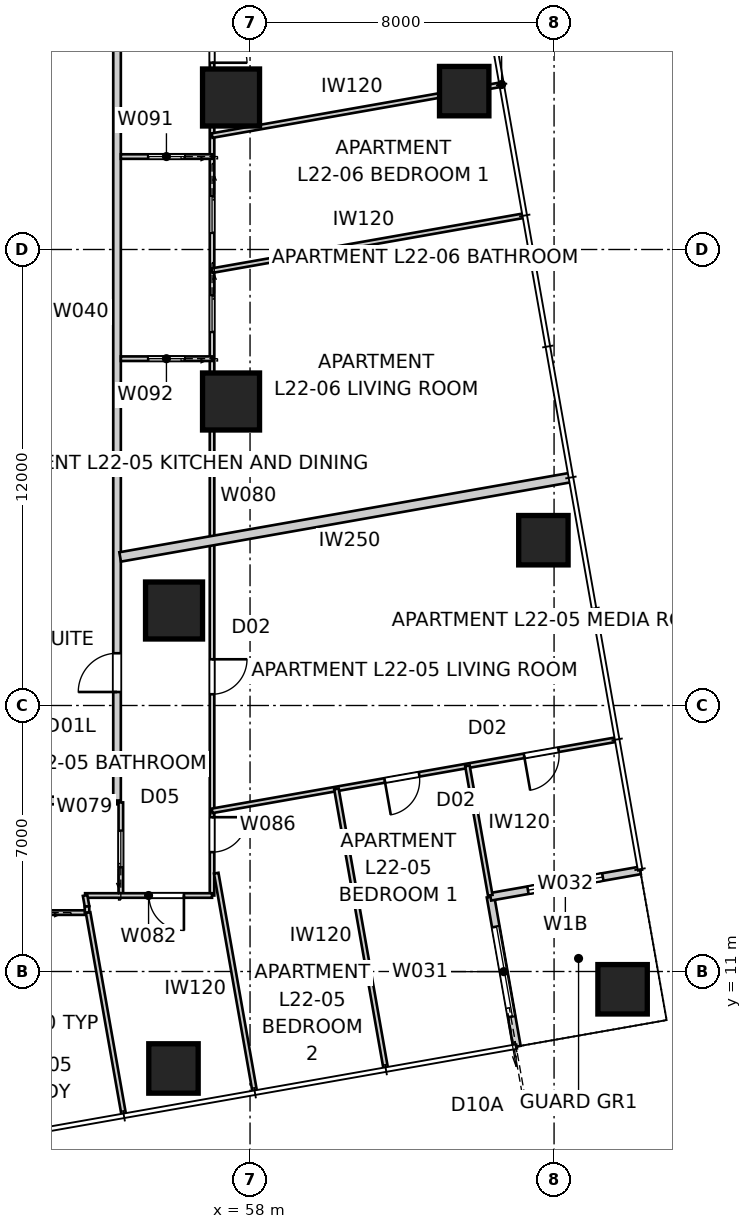
"""IFC4 building model, lengths in metres.
Left out: names, types, materials, properties, quantities, classifications, styles, units other than length and angle.
Written with IfcOpenShell. Run it as: python <this file> out.ifc"""

import sys

from ifc_helpers import new_model, si_unit, direction, frame, frame_2d, origin, origin_2d, place, context, subcontext, project, spatial, rectangle, extrude, element, fill, save


model = new_model("IFC4")
c1 = context("Model", 3, precision=1e-05, world=origin(), true_north=direction((0.0, 1.0)))
c2 = subcontext(c1, "Body", "Model", "MODEL_VIEW")
j1 = project(units=[si_unit("LENGTHUNIT", "METRE"), si_unit("PLANEANGLEUNIT", "RADIAN")], contexts=[c1])
p1 = place(None, origin())
s1 = spatial("IfcSite", under=j1, at=p1, CompositionType="ELEMENT")
p2 = place(p1, origin())
s2 = spatial("IfcBuilding", under=s1, at=p2, CompositionType="ELEMENT")
p3 = place(p2, frame((0.0, 0.0, 82.8)))
s3 = spatial("IfcBuildingStorey", under=s2, at=p3, CompositionType="ELEMENT", Elevation=82.8)
for number, where, z_axis, x_axis in (
    (1, (55.985, 8.448, 0.0), (0.0, 0.0, 1.0), (1.0, 0.0, 0.0)),
    (2, (67.803, 10.532, 0.0), (0.0, 0.0, 1.0), (1.0, 0.0, 0.0)),
    (3, (65.719, 22.35, 0.0), (0.0, 0.0, 1.0), (1.0, 0.0, 0.0)),
    (4, (63.635, 34.167, 0.0), (0.0, 0.0, 1.0), (1.0, 0.0, 0.0)),
):
    element("IfcColumn", number, at=place(p3, frame(where, z_axis=z_axis, x_axis=x_axis)), inside=s3, PredefinedType="COLUMN", context=c2, shape_type="SweptSolid", body=[
        extrude(rectangle(XDim=1.3, YDim=1.3, at=origin_2d()), origin(), (0.0, 0.0, 1.0), 3.4),
    ])
for number, where, z_axis, x_axis in (
    (5, (57.5, 26.0, 0.0), (0.0, 0.0, 1.0), (1.0, 0.0, 0.0)),
    (6, (57.5, 34.0, 0.0), (0.0, 0.0, 1.0), (1.0, 0.0, 0.0)),
    (7, (56.0, 20.5, 0.0), (0.0, 0.0, 1.0), (1.0, 0.0, 0.0)),
):
    element("IfcColumn", number, at=place(p3, frame(where, z_axis=z_axis, x_axis=x_axis)), inside=s3, PredefinedType="COLUMN", context=c2, shape_type="SweptSolid", body=[
        extrude(rectangle(XDim=1.5, YDim=1.5, at=origin_2d()), origin(), (0.0, 0.0, 1.0), 3.4),
    ])
p4 = place(p3, frame((65.022, 9.026, 0.0), z_axis=(0.0, 0.0, 1.0), x_axis=(-0.173646056486, 0.984808127031, 0.0)))
e8 = element("IfcWall", 8, at=p4, inside=s3, PredefinedType="SOLIDWALL", context=c2, shape_type="SweptSolid", body=[
    extrude(rectangle(XDim=4.0, YDim=0.2, at=frame_2d((2.0, 0.0))), origin(), (0.0, 0.0, 1.0), 3.25),
])
p5 = place(p4, frame((0.8, 0.0, 0.0)))
e9 = element("IfcOpeningElement", 9, at=p5, cuts=e8, PredefinedType="OPENING", context=c2, shape_type="SweptSolid", body=[
    extrude(rectangle(XDim=2.4, YDim=2.1, at=frame_2d((1.2, 1.05))), frame((0.0, 0.11, 0.0), z_axis=(0.0, -1.0, 0.0), x_axis=(1.0, 0.0, 0.0)), (0.0, 0.0, 1.0), 0.22),
])
p6 = place(p3, frame((64.328, 12.966, 0.0), z_axis=(0.0, 0.0, 1.0), x_axis=(0.984808127031, 0.173646056486, 0.0)))
e10 = element("IfcWall", 10, at=p6, inside=s3, PredefinedType="SOLIDWALL", context=c2, shape_type="SweptSolid", body=[
    extrude(rectangle(XDim=4.0, YDim=0.2, at=frame_2d((2.0, 0.0))), origin(), (0.0, 0.0, 1.0), 3.25),
])
p7 = place(p6, frame((1.0, 0.0, 0.45)))
e11 = element("IfcOpeningElement", 11, at=p7, cuts=e10, PredefinedType="OPENING", context=c2, shape_type="SweptSolid", body=[
    extrude(rectangle(XDim=2.0, YDim=1.8, at=frame_2d((1.0, 0.9))), frame((0.0, 0.11, 0.0), z_axis=(0.0, -1.0, 0.0), x_axis=(1.0, 0.0, 0.0)), (0.0, 0.0, 1.0), 0.22),
])
p8 = place(p3, frame((25.5, 15.5, 0.0), z_axis=(0.0, 0.0, 1.0), x_axis=(1.0, 0.0, 0.0)))
e12 = element("IfcWall", 12, at=p8, inside=s3, PredefinedType="PARTITIONING", context=c2, shape_type="SweptSolid", body=[
    extrude(rectangle(XDim=29.0, YDim=0.2, at=frame_2d((14.5, 0.0))), origin(), (0.0, 0.0, 1.0), 3.25),
])
p9 = place(p8, frame((15.794, 0.0, 0.0)))
e13 = element("IfcOpeningElement", 13, at=p9, cuts=e12, PredefinedType="OPENING", context=c2, shape_type="SweptSolid", body=[
    extrude(rectangle(XDim=1.02, YDim=2.34, at=frame_2d((0.51, 1.17))), frame((0.0, 0.11, 0.0), z_axis=(0.0, -1.0, 0.0), x_axis=(1.0, 0.0, 0.0)), (0.0, 0.0, 1.0), 0.22),
])
p10 = place(p8, frame((6.067, 0.0, 0.0)))
e14 = element("IfcOpeningElement", 14, at=p10, cuts=e12, PredefinedType="OPENING", context=c2, shape_type="SweptSolid", body=[
    extrude(rectangle(XDim=1.02, YDim=2.34, at=frame_2d((0.51, 1.17))), frame((0.0, 0.11, 0.0), z_axis=(0.0, -1.0, 0.0), x_axis=(1.0, 0.0, 0.0)), (0.0, 0.0, 1.0), 0.22),
])
p11 = place(p8, frame((1.079, 0.0, 0.0)))
e15 = element("IfcOpeningElement", 15, at=p11, cuts=e12, PredefinedType="OPENING", context=c2, shape_type="SweptSolid", body=[
    extrude(rectangle(XDim=1.02, YDim=2.34, at=frame_2d((0.51, 1.17))), frame((0.0, 0.11, 0.0), z_axis=(0.0, -1.0, 0.0), x_axis=(1.0, 0.0, 0.0)), (0.0, 0.0, 1.0), 0.22),
])
p12 = place(p3, frame((54.5, 15.5, 0.0), z_axis=(0.0, 0.0, 1.0), x_axis=(0.0, 1.0, 0.0)))
e16 = element("IfcWall", 16, at=p12, inside=s3, PredefinedType="PARTITIONING", context=c2, shape_type="SweptSolid", body=[
    extrude(rectangle(XDim=29.0, YDim=0.2, at=frame_2d((14.5, 0.0))), origin(), (0.0, 0.0, 1.0), 3.25),
])
p13 = place(p12, frame((21.815, 0.0, 0.0)))
e17 = element("IfcOpeningElement", 17, at=p13, cuts=e16, PredefinedType="OPENING", context=c2, shape_type="SweptSolid", body=[
    extrude(rectangle(XDim=1.02, YDim=2.34, at=frame_2d((0.51, 1.17))), frame((0.0, 0.11, 0.0), z_axis=(0.0, -1.0, 0.0), x_axis=(1.0, 0.0, 0.0)), (0.0, 0.0, 1.0), 0.22),
])
p14 = place(p12, frame((2.855, 0.0, 0.0)))
e18 = element("IfcOpeningElement", 18, at=p14, cuts=e16, PredefinedType="OPENING", context=c2, shape_type="SweptSolid", body=[
    extrude(rectangle(XDim=1.02, YDim=2.1, at=frame_2d((0.51, 1.05))), frame((0.0, 0.11, 0.0), z_axis=(0.0, -1.0, 0.0), x_axis=(1.0, 0.0, 0.0)), (0.0, 0.0, 1.0), 0.22),
])
p15 = place(p3, frame((66.444, 24.001, 0.0), z_axis=(0.0, 0.0, 1.0), x_axis=(-0.984806609184, -0.173654664517, 0.0)))
e19 = element("IfcWall", 19, at=p15, inside=s3, PredefinedType="PARTITIONING", context=c2, shape_type="SweptSolid", body=[
    extrude(rectangle(XDim=12.044, YDim=0.25, at=frame_2d((6.022, 0.0))), origin(), (0.0, 0.0, 1.0), 3.25),
])
p16 = place(p3, frame((54.6, 13.0, 0.0), z_axis=(0.0, 0.0, 1.0), x_axis=(0.0, 1.0, 0.0)))
e20 = element("IfcWall", 20, at=p16, inside=s3, PredefinedType="PARTITIONING", context=c2, shape_type="SweptSolid", body=[
    extrude(rectangle(XDim=2.45, YDim=0.12, at=frame_2d((1.225, 0.0))), origin(), (0.0, 0.0, 1.0), 3.25),
])
p17 = place(p16, frame((0.745, 0.0, 0.0)))
e21 = element("IfcOpeningElement", 21, at=p17, cuts=e20, PredefinedType="OPENING", context=c2, shape_type="SweptSolid", body=[
    extrude(rectangle(XDim=0.96, YDim=2.1, at=frame_2d((0.48, 1.05))), frame((0.0, 0.07, 0.0), z_axis=(0.0, -1.0, 0.0), x_axis=(1.0, 0.0, 0.0)), (0.0, 0.0, 1.0), 0.14),
])
p18 = place(p3, frame((57.0, 47.0, 0.0), z_axis=(0.0, 0.0, 1.0), x_axis=(0.0, -1.0, 0.0)))
e22 = element("IfcWall", 22, at=p18, inside=s3, PredefinedType="PARTITIONING", context=c2, shape_type="SweptSolid", body=[
    extrude(rectangle(XDim=34.0, YDim=0.12, at=frame_2d((17.0, 0.0))), origin(), (0.0, 0.0, 1.0), 2.55),
])
p19 = place(p18, frame((8.361, 0.0, 0.0)))
e23 = element("IfcOpeningElement", 23, at=p19, cuts=e22, PredefinedType="OPENING", context=c2, shape_type="SweptSolid", body=[
    extrude(rectangle(XDim=0.92, YDim=2.34, at=frame_2d((0.46, 1.17))), frame((0.0, 0.07, 0.0), z_axis=(0.0, -1.0, 0.0), x_axis=(1.0, 0.0, 0.0)), (0.0, 0.0, 1.0), 0.14),
])
p20 = place(p18, frame((11.166, 0.0, 0.0)))
e24 = element("IfcOpeningElement", 24, at=p20, cuts=e22, PredefinedType="OPENING", context=c2, shape_type="SweptSolid", body=[
    extrude(rectangle(XDim=0.92, YDim=2.34, at=frame_2d((0.46, 1.17))), frame((0.0, 0.07, 0.0), z_axis=(0.0, -1.0, 0.0), x_axis=(1.0, 0.0, 0.0)), (0.0, 0.0, 1.0), 0.14),
])
p21 = place(p18, frame((4.683, 0.0, 0.0)))
e25 = element("IfcOpeningElement", 25, at=p21, cuts=e22, PredefinedType="OPENING", context=c2, shape_type="SweptSolid", body=[
    extrude(rectangle(XDim=0.92, YDim=2.34, at=frame_2d((0.46, 1.17))), frame((0.0, 0.07, 0.0), z_axis=(0.0, -1.0, 0.0), x_axis=(1.0, 0.0, 0.0)), (0.0, 0.0, 1.0), 0.14),
])
p22 = place(p18, frame((27.784, 0.0, 0.0)))
e26 = element("IfcOpeningElement", 26, at=p22, cuts=e22, PredefinedType="OPENING", context=c2, shape_type="SweptSolid", body=[
    extrude(rectangle(XDim=0.92, YDim=2.34, at=frame_2d((0.46, 1.17))), frame((0.0, 0.07, 0.0), z_axis=(0.0, -1.0, 0.0), x_axis=(1.0, 0.0, 0.0)), (0.0, 0.0, 1.0), 0.14),
])
p23 = place(p18, frame((31.939, 0.0, 0.0)))
e27 = element("IfcOpeningElement", 27, at=p23, cuts=e22, PredefinedType="OPENING", context=c2, shape_type="SweptSolid", body=[
    extrude(rectangle(XDim=0.92, YDim=2.34, at=frame_2d((0.46, 1.17))), frame((0.0, 0.07, 0.0), z_axis=(0.0, -1.0, 0.0), x_axis=(1.0, 0.0, 0.0)), (0.0, 0.0, 1.0), 0.14),
])
p24 = place(p18, frame((15.601, 0.0, 0.0)))
e28 = element("IfcOpeningElement", 28, at=p24, cuts=e22, PredefinedType="OPENING", context=c2, shape_type="SweptSolid", body=[
    extrude(rectangle(XDim=0.96, YDim=2.1, at=frame_2d((0.48, 1.05))), frame((0.0, 0.07, 0.0), z_axis=(0.0, -1.0, 0.0), x_axis=(1.0, 0.0, 0.0)), (0.0, 0.0, 1.0), 0.14),
])
p25 = place(p18, frame((18.21, 0.0, 0.0)))
e29 = element("IfcOpeningElement", 29, at=p25, cuts=e22, PredefinedType="OPENING", context=c2, shape_type="SweptSolid", body=[
    extrude(rectangle(XDim=0.96, YDim=2.1, at=frame_2d((0.48, 1.05))), frame((0.0, 0.07, 0.0), z_axis=(0.0, -1.0, 0.0), x_axis=(1.0, 0.0, 0.0)), (0.0, 0.0, 1.0), 0.14),
])
p26 = place(p18, frame((1.19, 0.0, 0.0)))
e30 = element("IfcOpeningElement", 30, at=p26, cuts=e22, PredefinedType="OPENING", context=c2, shape_type="SweptSolid", body=[
    extrude(rectangle(XDim=0.96, YDim=2.1, at=frame_2d((0.48, 1.05))), frame((0.0, 0.07, 0.0), z_axis=(0.0, -1.0, 0.0), x_axis=(1.0, 0.0, 0.0)), (0.0, 0.0, 1.0), 0.14),
])
p27 = place(p3, frame((57.0, 13.0, 0.0), z_axis=(0.0, 0.0, 1.0), x_axis=(-1.0, 0.0, 0.0)))
e31 = element("IfcWall", 31, at=p27, inside=s3, PredefinedType="PARTITIONING", context=c2, shape_type="SweptSolid", body=[
    extrude(rectangle(XDim=3.34, YDim=0.12, at=frame_2d((1.67, 0.0))), origin(), (0.0, 0.0, 1.0), 3.25),
])
p28 = place(p27, frame((0.74, 0.0, 0.0)))
e32 = element("IfcOpeningElement", 32, at=p28, cuts=e31, PredefinedType="OPENING", context=c2, shape_type="SweptSolid", body=[
    extrude(rectangle(XDim=0.92, YDim=2.34, at=frame_2d((0.46, 1.17))), frame((0.0, 0.07, 0.0), z_axis=(0.0, -1.0, 0.0), x_axis=(1.0, 0.0, 0.0)), (0.0, 0.0, 1.0), 0.14),
])
p29 = place(p3, frame((53.71, 12.55, 0.0), z_axis=(0.0, 0.0, 1.0), x_axis=(-1.0, 0.0, 0.0)))
e33 = element("IfcWall", 33, at=p29, inside=s3, PredefinedType="PARTITIONING", context=c2, shape_type="SweptSolid", body=[
    extrude(rectangle(XDim=3.525, YDim=0.12, at=frame_2d((1.763, 0.0))), origin(), (0.0, 0.0, 1.0), 3.25),
])
p30 = place(p29, frame((1.283, 0.0, 0.0)))
e34 = element("IfcOpeningElement", 34, at=p30, cuts=e33, PredefinedType="OPENING", context=c2, shape_type="SweptSolid", body=[
    extrude(rectangle(XDim=0.96, YDim=2.1, at=frame_2d((0.48, 1.05))), frame((0.0, 0.07, 0.0), z_axis=(0.0, -1.0, 0.0), x_axis=(1.0, 0.0, 0.0)), (0.0, 0.0, 1.0), 0.14),
])
p31 = place(p3, frame((53.66, 13.0, 0.0), z_axis=(0.0, 0.0, 1.0), x_axis=(0.172927442902, -0.984934566096, 0.0)))
e35 = element("IfcWall", 35, at=p31, inside=s3, PredefinedType="PARTITIONING", context=c2, shape_type="SweptSolid", body=[
    extrude(rectangle(XDim=0.292, YDim=0.12, at=frame_2d((0.146, 0.0))), origin(), (0.0, 0.0, 1.0), 3.25),
])
p32 = place(p3, frame((67.62, 17.1, 0.0), z_axis=(0.0, 0.0, 1.0), x_axis=(-0.984807253583, -0.173651010046, 0.0)))
e36 = element("IfcWall", 36, at=p32, inside=s3, PredefinedType="PARTITIONING", context=c2, shape_type="SweptSolid", body=[
    extrude(rectangle(XDim=10.783, YDim=0.12, at=frame_2d((5.392, 0.0))), origin(), (0.0, 0.0, 1.0), 3.25),
])
p33 = place(p32, frame((1.525, 0.0, 0.0)))
e37 = element("IfcOpeningElement", 37, at=p33, cuts=e36, PredefinedType="OPENING", context=c2, shape_type="SweptSolid", body=[
    extrude(rectangle(XDim=0.92, YDim=2.34, at=frame_2d((0.46, 1.17))), frame((0.0, 0.07, 0.0), z_axis=(0.0, -1.0, 0.0), x_axis=(1.0, 0.0, 0.0)), (0.0, 0.0, 1.0), 0.14),
])
p34 = place(p32, frame((5.25, 0.0, 0.0)))
e38 = element("IfcOpeningElement", 38, at=p34, cuts=e36, PredefinedType="OPENING", context=c2, shape_type="SweptSolid", body=[
    extrude(rectangle(XDim=0.92, YDim=2.34, at=frame_2d((0.46, 1.17))), frame((0.0, 0.07, 0.0), z_axis=(0.0, -1.0, 0.0), x_axis=(1.0, 0.0, 0.0)), (0.0, 0.0, 1.0), 0.14),
])
p35 = place(p3, frame((61.568, 8.458, 0.0), z_axis=(0.0, 0.0, 1.0), x_axis=(-0.173647177755, 0.984807929323, 0.0)))
e39 = element("IfcWall", 39, at=p35, inside=s3, PredefinedType="PARTITIONING", context=c2, shape_type="SweptSolid", body=[
    extrude(rectangle(XDim=7.46, YDim=0.12, at=frame_2d((3.73, 0.0))), origin(), (0.0, 0.0, 1.0), 3.25),
])
p36 = place(p3, frame((63.72, 16.412, 0.0), z_axis=(0.0, 0.0, 1.0), x_axis=(0.173660541335, -0.984805572884, 0.0)))
e40 = element("IfcWall", 40, at=p36, inside=s3, PredefinedType="PARTITIONING", context=c2, shape_type="SweptSolid", body=[
    extrude(rectangle(XDim=3.46, YDim=0.12, at=frame_2d((1.73, 0.0))), origin(), (0.0, 0.0, 1.0), 3.25),
])
p37 = place(p3, frame((58.122, 7.85, 0.0), z_axis=(0.0, 0.0, 1.0), x_axis=(-0.173634707655, 0.984810128044, 0.0)))
e41 = element("IfcWall", 41, at=p37, inside=s3, PredefinedType="PARTITIONING", context=c2, shape_type="SweptSolid", body=[
    extrude(rectangle(XDim=5.825, YDim=0.12, at=frame_2d((2.913, 0.0))), origin(), (0.0, 0.0, 1.0), 2.638),
])
p38 = place(p3, frame((53.739, 12.55, 0.0), z_axis=(0.0, 0.0, 1.0), x_axis=(0.173632864151, -0.984810453076, 0.0)))
e42 = element("IfcWall", 42, at=p38, inside=s3, PredefinedType="PARTITIONING", context=c2, shape_type="SweptSolid", body=[
    extrude(rectangle(XDim=5.389, YDim=0.12, at=frame_2d((2.695, 0.0))), origin(), (0.0, 0.0, 1.0), 3.25),
])
p39 = place(p3, frame((57.0, 32.446, 0.0), z_axis=(0.0, 0.0, 1.0), x_axis=(-1.0, 0.0, 0.0)))
e43 = element("IfcWall", 43, at=p39, inside=s3, PredefinedType="PARTITIONING", context=c2, shape_type="SweptSolid", body=[
    extrude(rectangle(XDim=2.4, YDim=0.12, at=frame_2d((1.2, 0.0))), origin(), (0.0, 0.0, 1.0), 3.25),
])
p40 = place(p39, frame((0.72, 0.0, 0.0)))
e44 = element("IfcOpeningElement", 44, at=p40, cuts=e43, PredefinedType="OPENING", context=c2, shape_type="SweptSolid", body=[
    extrude(rectangle(XDim=0.96, YDim=2.1, at=frame_2d((0.48, 1.05))), frame((0.0, 0.07, 0.0), z_axis=(0.0, -1.0, 0.0), x_axis=(1.0, 0.0, 0.0)), (0.0, 0.0, 1.0), 0.14),
])
p41 = place(p3, frame((57.0, 27.126, 0.0), z_axis=(0.0, 0.0, 1.0), x_axis=(-1.0, 0.0, 0.0)))
e45 = element("IfcWall", 45, at=p41, inside=s3, PredefinedType="PARTITIONING", context=c2, shape_type="SweptSolid", body=[
    extrude(rectangle(XDim=2.4, YDim=0.12, at=frame_2d((1.2, 0.0))), origin(), (0.0, 0.0, 1.0), 2.795),
])
p42 = place(p41, frame((0.72, 0.0, 0.0)))
e46 = element("IfcOpeningElement", 46, at=p42, cuts=e45, PredefinedType="OPENING", context=c2, shape_type="SweptSolid", body=[
    extrude(rectangle(XDim=0.96, YDim=2.1, at=frame_2d((0.48, 1.05))), frame((0.0, 0.07, 0.0), z_axis=(0.0, -1.0, 0.0), x_axis=(1.0, 0.0, 0.0)), (0.0, 0.0, 1.0), 0.14),
])
p43 = place(p3, frame((57.0, 29.444, 0.0), z_axis=(0.0, 0.0, 1.0), x_axis=(0.984807787824, 0.173647980238, 0.0)))
e47 = element("IfcWall", 47, at=p43, inside=s3, PredefinedType="PARTITIONING", context=c2, shape_type="SweptSolid", body=[
    extrude(rectangle(XDim=8.315, YDim=0.12, at=frame_2d((4.157, 0.0))), origin(), (0.0, 0.0, 1.0), 3.25),
])
p44 = place(p3, frame((57.0, 32.998, 0.0), z_axis=(0.0, 0.0, 1.0), x_axis=(0.984808453088, 0.173644207293, 0.0)))
e48 = element("IfcWall", 48, at=p44, inside=s3, PredefinedType="PARTITIONING", context=c2, shape_type="SweptSolid", body=[
    extrude(rectangle(XDim=7.698, YDim=0.12, at=frame_2d((3.849, 0.0))), origin(), (0.0, 0.0, 1.0), 3.25),
])
p45 = place(p3, frame((53.71, 12.712, 0.0), z_axis=(0.0, 0.0, 1.0), x_axis=(0.0, -1.0, 0.0)))
e49 = element("IfcWall", 49, at=p45, inside=s3, PredefinedType="PARTITIONING", context=c2, shape_type="SweptSolid", body=[
    extrude(rectangle(XDim=0.162, YDim=0.12, at=frame_2d((0.081, 0.0))), origin(), (0.0, 0.0, 1.0), 3.25),
])
p46 = place(p5, origin())
e50 = element("IfcDoor", 50, at=p46, inside=s3, OperationType="SLIDING_TO_LEFT", PredefinedType="DOOR", context=c2, shape_type="SweptSolid", body=[
    extrude(rectangle(XDim=2.4, YDim=2.1, at=frame_2d((1.2, 1.05))), frame((0.0, 0.025, 0.0), z_axis=(0.0, -1.0, 0.0), x_axis=(1.0, 0.0, 0.0)), (0.0, 0.0, 1.0), 0.05),
])
fill(e9, e50)
p47 = place(p7, origin())
e51 = element("IfcWindow", 51, at=p47, inside=s3, PartitioningType="SINGLE_PANEL", PredefinedType="WINDOW", context=c2, shape_type="SweptSolid", body=[
    extrude(rectangle(XDim=2.0, YDim=1.8, at=frame_2d((1.0, 0.9))), frame((0.0, 0.03, 0.0), z_axis=(0.0, -1.0, 0.0), x_axis=(1.0, 0.0, 0.0)), (0.0, 0.0, 1.0), 0.06),
])
fill(e11, e51)
p48 = place(p14, origin())
e52 = element("IfcDoor", 52, at=p48, inside=s3, OperationType="SINGLE_SWING_LEFT", PredefinedType="DOOR", context=c2, shape_type="SweptSolid", body=[
    extrude(rectangle(XDim=1.02, YDim=2.1, at=frame_2d((0.51, 1.05))), frame((0.0, 0.025, 0.0), z_axis=(0.0, -1.0, 0.0), x_axis=(1.0, 0.0, 0.0)), (0.0, 0.0, 1.0), 0.05),
])
fill(e18, e52)
p49 = place(p20, origin())
e53 = element("IfcDoor", 53, at=p49, inside=s3, OperationType="SINGLE_SWING_RIGHT", PredefinedType="DOOR", context=c2, shape_type="SweptSolid", body=[
    extrude(rectangle(XDim=0.92, YDim=2.34, at=frame_2d((0.46, 1.17))), frame((0.0, 0.025, 0.0), z_axis=(0.0, -1.0, 0.0), x_axis=(1.0, 0.0, 0.0)), (0.0, 0.0, 1.0), 0.05),
])
fill(e24, e53)
p50 = place(p40, origin())
e54 = element("IfcDoor", 54, at=p50, inside=s3, OperationType="SLIDING_TO_LEFT", PredefinedType="DOOR", context=c2, shape_type="SweptSolid", body=[
    extrude(rectangle(XDim=0.96, YDim=2.1, at=frame_2d((0.48, 1.05))), frame((0.0, 0.025, 0.0), z_axis=(0.0, -1.0, 0.0), x_axis=(1.0, 0.0, 0.0)), (0.0, 0.0, 1.0), 0.05),
])
fill(e44, e54)
p51 = place(p22, origin())
e55 = element("IfcDoor", 55, at=p51, inside=s3, OperationType="SINGLE_SWING_LEFT", PredefinedType="DOOR", context=c2, shape_type="SweptSolid", body=[
    extrude(rectangle(XDim=0.92, YDim=2.34, at=frame_2d((0.46, 1.17))), frame((0.0, 0.025, 0.0), z_axis=(0.0, -1.0, 0.0), x_axis=(1.0, 0.0, 0.0)), (0.0, 0.0, 1.0), 0.05),
])
fill(e26, e55)
p52 = place(p17, origin())
e56 = element("IfcDoor", 56, at=p52, inside=s3, OperationType="SLIDING_TO_LEFT", PredefinedType="DOOR", context=c2, shape_type="SweptSolid", body=[
    extrude(rectangle(XDim=0.96, YDim=2.1, at=frame_2d((0.48, 1.05))), frame((0.0, 0.025, 0.0), z_axis=(0.0, -1.0, 0.0), x_axis=(1.0, 0.0, 0.0)), (0.0, 0.0, 1.0), 0.05),
])
fill(e21, e56)
p53 = place(p28, origin())
e57 = element("IfcDoor", 57, at=p53, inside=s3, OperationType="SINGLE_SWING_LEFT", PredefinedType="DOOR", context=c2, shape_type="SweptSolid", body=[
    extrude(rectangle(XDim=0.92, YDim=2.34, at=frame_2d((0.46, 1.17))), frame((0.0, 0.025, 0.0), z_axis=(0.0, -1.0, 0.0), x_axis=(1.0, 0.0, 0.0)), (0.0, 0.0, 1.0), 0.05),
])
fill(e32, e57)
p54 = place(p23, origin())
e58 = element("IfcDoor", 58, at=p54, inside=s3, OperationType="SINGLE_SWING_LEFT", PredefinedType="DOOR", context=c2, shape_type="SweptSolid", body=[
    extrude(rectangle(XDim=0.92, YDim=2.34, at=frame_2d((0.46, 1.17))), frame((0.0, 0.025, 0.0), z_axis=(0.0, -1.0, 0.0), x_axis=(1.0, 0.0, 0.0)), (0.0, 0.0, 1.0), 0.05),
])
fill(e27, e58)
p55 = place(p24, origin())
e59 = element("IfcDoor", 59, at=p55, inside=s3, OperationType="SLIDING_TO_LEFT", PredefinedType="DOOR", context=c2, shape_type="SweptSolid", body=[
    extrude(rectangle(XDim=0.96, YDim=2.1, at=frame_2d((0.48, 1.05))), frame((0.0, 0.025, 0.0), z_axis=(0.0, -1.0, 0.0), x_axis=(1.0, 0.0, 0.0)), (0.0, 0.0, 1.0), 0.05),
])
fill(e28, e59)
p56 = place(p42, origin())
e60 = element("IfcDoor", 60, at=p56, inside=s3, OperationType="SLIDING_TO_LEFT", PredefinedType="DOOR", context=c2, shape_type="SweptSolid", body=[
    extrude(rectangle(XDim=0.96, YDim=2.1, at=frame_2d((0.48, 1.05))), frame((0.0, 0.025, 0.0), z_axis=(0.0, -1.0, 0.0), x_axis=(1.0, 0.0, 0.0)), (0.0, 0.0, 1.0), 0.05),
])
fill(e46, e60)
p57 = place(p25, origin())
e61 = element("IfcDoor", 61, at=p57, inside=s3, OperationType="SLIDING_TO_LEFT", PredefinedType="DOOR", context=c2, shape_type="SweptSolid", body=[
    extrude(rectangle(XDim=0.96, YDim=2.1, at=frame_2d((0.48, 1.05))), frame((0.0, 0.025, 0.0), z_axis=(0.0, -1.0, 0.0), x_axis=(1.0, 0.0, 0.0)), (0.0, 0.0, 1.0), 0.05),
])
fill(e29, e61)
p58 = place(p33, origin())
e62 = element("IfcDoor", 62, at=p58, inside=s3, OperationType="SINGLE_SWING_RIGHT", PredefinedType="DOOR", context=c2, shape_type="SweptSolid", body=[
    extrude(rectangle(XDim=0.92, YDim=2.34, at=frame_2d((0.46, 1.17))), frame((0.0, 0.025, 0.0), z_axis=(0.0, -1.0, 0.0), x_axis=(1.0, 0.0, 0.0)), (0.0, 0.0, 1.0), 0.05),
])
fill(e37, e62)
p59 = place(p34, origin())
e63 = element("IfcDoor", 63, at=p59, inside=s3, OperationType="SINGLE_SWING_RIGHT", PredefinedType="DOOR", context=c2, shape_type="SweptSolid", body=[
    extrude(rectangle(XDim=0.92, YDim=2.34, at=frame_2d((0.46, 1.17))), frame((0.0, 0.025, 0.0), z_axis=(0.0, -1.0, 0.0), x_axis=(1.0, 0.0, 0.0)), (0.0, 0.0, 1.0), 0.05),
])
fill(e38, e63)
save(model, sys.argv[1])
